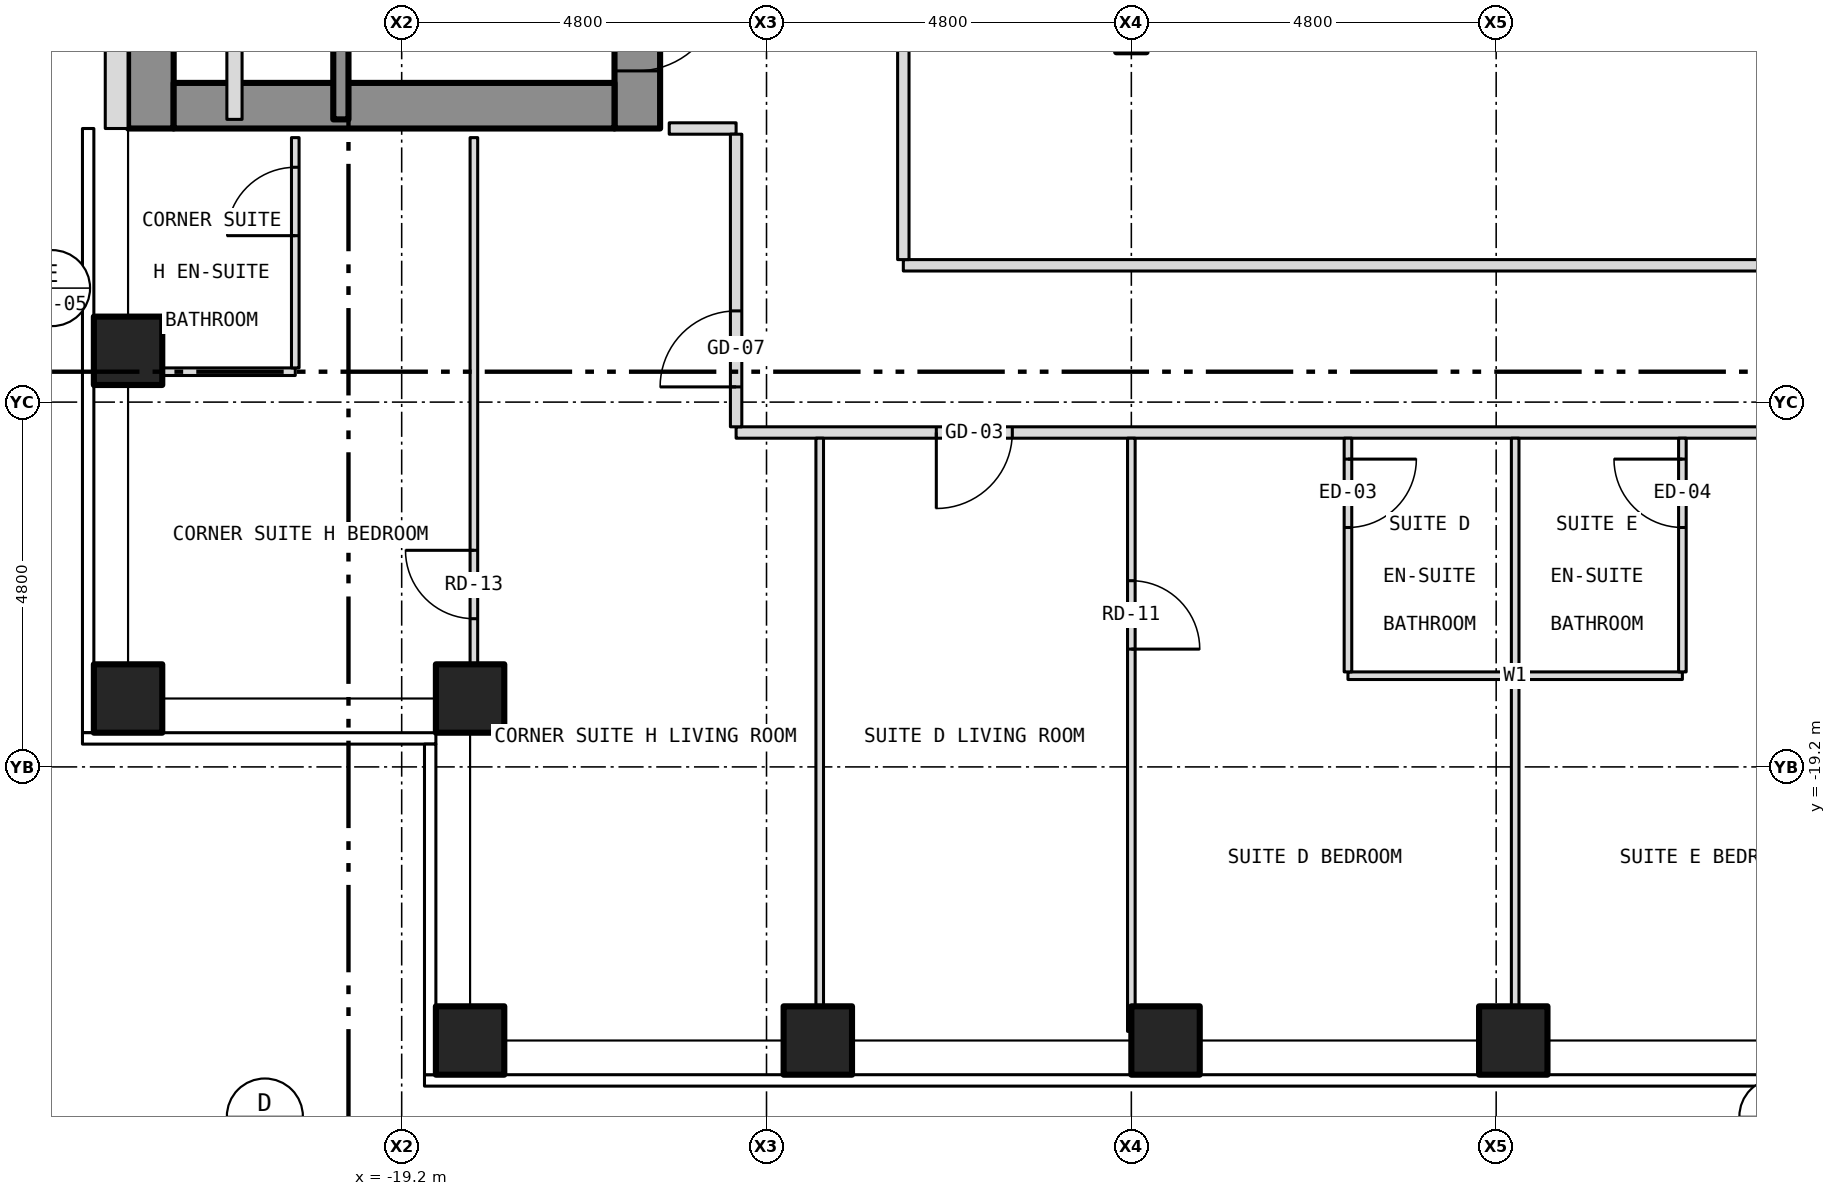
"""IFC4 building model, lengths in metres.
Left out: names, types, materials, properties, quantities, classifications, styles, units other than length and angle.
Written with IfcOpenShell. Run it as: python <this file> out.ifc"""

import sys

from ifc_helpers import new_model, si_unit, direction, frame, frame_2d, origin, origin_2d, place, context, subcontext, project, spatial, rectangle, hollow_rectangle, extrude, element, fill, save


model = new_model("IFC4")
c1 = context("Model", 3, precision=1e-05, world=origin(), true_north=direction((0.0, 1.0)))
c2 = subcontext(c1, "Body", "Model", "MODEL_VIEW")
j1 = project(units=[si_unit("LENGTHUNIT", "METRE"), si_unit("PLANEANGLEUNIT", "RADIAN")], contexts=[c1])
p1 = place(None, origin())
s1 = spatial("IfcSite", under=j1, at=p1, CompositionType="ELEMENT")
p2 = place(p1, origin())
s2 = spatial("IfcBuilding", under=s1, at=p2, CompositionType="ELEMENT")
p3 = place(p2, frame((0.0, 0.0, 99.5)))
s3 = spatial("IfcBuildingStorey", under=s2, at=p3, CompositionType="ELEMENT", Elevation=99.5)
for number, where, z_axis, x_axis in (
    (1, (-18.3, -22.8, -0.15), (0.0, 0.0, 1.0), (1.0, 0.0, 0.0)),
    (2, (-13.725, -22.8, -0.15), (0.0, 0.0, 1.0), (1.0, 0.0, 0.0)),
    (3, (-9.15, -22.8, -0.15), (0.0, 0.0, 1.0), (1.0, 0.0, 0.0)),
    (4, (-4.575, -22.8, -0.15), (0.0, 0.0, 1.0), (1.0, 0.0, 0.0)),
    (5, (-22.8, -18.3, -0.15), (0.0, 0.0, 1.0), (1.0, 0.0, 0.0)),
    (6, (-22.8, -13.725, -0.15), (0.0, 0.0, 1.0), (1.0, 0.0, 0.0)),
    (7, (-18.3, -18.3, -0.15), (0.0, 0.0, 1.0), (1.0, 0.0, 0.0)),
):
    element("IfcColumn", number, at=place(p3, frame(where, z_axis=z_axis, x_axis=x_axis)), inside=s3, PredefinedType="COLUMN", context=c2, shape_type="SweptSolid", body=[
        extrude(hollow_rectangle(XDim=0.9, YDim=0.9, WallThickness=0.05, at=origin_2d()), origin(), (0.0, 0.0, 1.0), 3.5),
    ])
p4 = place(p3, frame((-16.1, -10.8, 0.0), z_axis=(0.0, 0.0, 1.0), x_axis=(0.0, 1.0, 0.0)))
e8 = element("IfcWall", 8, at=p4, inside=s3, PredefinedType="SHEAR", context=c2, shape_type="SweptSolid", body=[
    extrude(rectangle(XDim=21.6, YDim=0.6, at=frame_2d((10.8, 0.0))), origin(), (0.0, 0.0, 1.0), 3.25),
])
p5 = place(p4, frame((9.4, 0.0, 0.0)))
e9 = element("IfcOpeningElement", 9, at=p5, cuts=e8, PredefinedType="OPENING", context=c2, shape_type="SweptSolid", body=[
    extrude(rectangle(XDim=1.1, YDim=2.1, at=frame_2d((0.55, 1.05))), frame((0.0, 0.312, 0.0), z_axis=(0.0, -1.0, 0.0), x_axis=(1.0, 0.0, 0.0)), (0.0, 0.0, 1.0), 0.624),
])
p6 = place(p4, frame((11.5, 0.0, 0.0)))
e10 = element("IfcOpeningElement", 10, at=p6, cuts=e8, PredefinedType="OPENING", context=c2, shape_type="SweptSolid", body=[
    extrude(rectangle(XDim=1.1, YDim=2.1, at=frame_2d((0.55, 1.05))), frame((0.0, 0.312, 0.0), z_axis=(0.0, -1.0, 0.0), x_axis=(1.0, 0.0, 0.0)), (0.0, 0.0, 1.0), 0.624),
])
p7 = place(p4, frame((13.6, 0.0, 0.0)))
e11 = element("IfcOpeningElement", 11, at=p7, cuts=e8, PredefinedType="OPENING", context=c2, shape_type="SweptSolid", body=[
    extrude(rectangle(XDim=1.1, YDim=2.1, at=frame_2d((0.55, 1.05))), frame((0.0, 0.312, 0.0), z_axis=(0.0, -1.0, 0.0), x_axis=(1.0, 0.0, 0.0)), (0.0, 0.0, 1.0), 0.624),
])
p8 = place(p4, frame((15.7, 0.0, 0.0)))
e12 = element("IfcOpeningElement", 12, at=p8, cuts=e8, PredefinedType="OPENING", context=c2, shape_type="SweptSolid", body=[
    extrude(rectangle(XDim=1.1, YDim=2.1, at=frame_2d((0.55, 1.05))), frame((0.0, 0.312, 0.0), z_axis=(0.0, -1.0, 0.0), x_axis=(1.0, 0.0, 0.0)), (0.0, 0.0, 1.0), 0.624),
])
p9 = place(p4, frame((17.8, 0.0, 0.0)))
e13 = element("IfcOpeningElement", 13, at=p9, cuts=e8, PredefinedType="OPENING", context=c2, shape_type="SweptSolid", body=[
    extrude(rectangle(XDim=1.1, YDim=2.1, at=frame_2d((0.55, 1.05))), frame((0.0, 0.312, 0.0), z_axis=(0.0, -1.0, 0.0), x_axis=(1.0, 0.0, 0.0)), (0.0, 0.0, 1.0), 0.624),
])
p10 = place(p4, frame((0.758, 0.0, 0.0)))
e14 = element("IfcOpeningElement", 14, at=p10, cuts=e8, PredefinedType="OPENING", context=c2, shape_type="SweptSolid", body=[
    extrude(rectangle(XDim=1.1, YDim=2.1, at=frame_2d((0.55, 1.05))), frame((0.0, 0.312, 0.0), z_axis=(0.0, -1.0, 0.0), x_axis=(1.0, 0.0, 0.0)), (0.0, 0.0, 1.0), 0.624),
])
p11 = place(p4, frame((7.5, 0.0, 0.0)))
e15 = element("IfcOpeningElement", 15, at=p11, cuts=e8, PredefinedType="OPENING", context=c2, shape_type="SweptSolid", body=[
    extrude(rectangle(XDim=1.1, YDim=2.1, at=frame_2d((0.55, 1.05))), frame((0.0, 0.312, 0.0), z_axis=(0.0, -1.0, 0.0), x_axis=(1.0, 0.0, 0.0)), (0.0, 0.0, 1.0), 0.624),
])
p12 = place(p3, frame((-22.5, -10.8, 0.0), z_axis=(0.0, 0.0, 1.0), x_axis=(0.0, 1.0, 0.0)))
e16 = element("IfcWall", 16, at=p12, inside=s3, PredefinedType="SHEAR", context=c2, shape_type="SweptSolid", body=[
    extrude(rectangle(XDim=21.6, YDim=0.6, at=frame_2d((10.8, 0.0))), origin(), (0.0, 0.0, 1.0), 3.25),
])
p13 = place(p3, frame((-22.2, -10.5, 0.0), z_axis=(0.0, 0.0, 1.0), x_axis=(1.0, 0.0, 0.0)))
e17 = element("IfcWall", 17, at=p13, inside=s3, PredefinedType="SHEAR", context=c2, shape_type="SweptSolid", body=[
    extrude(rectangle(XDim=5.8, YDim=0.6, at=frame_2d((2.9, 0.0))), origin(), (0.0, 0.0, 1.0), 3.25),
])
p14 = place(p3, frame((-22.95, 10.8, 0.0), z_axis=(0.0, 0.0, 1.0), x_axis=(0.0, -1.0, 0.0)))
e18 = element("IfcWall", 18, at=p14, inside=s3, PredefinedType="SOLIDWALL", context=c2, shape_type="SweptSolid", body=[
    extrude(rectangle(XDim=21.6, YDim=0.3, at=frame_2d((10.8, 0.0))), origin(), (0.0, 0.0, 1.0), 3.5),
])
p15 = place(p14, frame((18.05, 0.0, 1.0)))
e19 = element("IfcOpeningElement", 19, at=p15, cuts=e18, PredefinedType="OPENING", context=c2, shape_type="SweptSolid", body=[
    extrude(rectangle(XDim=0.6, YDim=1.5, at=frame_2d((0.3, 0.75))), frame((0.0, 0.162, 0.0), z_axis=(0.0, -1.0, 0.0), x_axis=(1.0, 0.0, 0.0)), (0.0, 0.0, 1.0), 0.324),
])
p16 = place(p3, frame((-6.75, -18.0, 0.0), z_axis=(0.0, 0.0, 1.0), x_axis=(1.0, 0.0, 0.0)))
e20 = element("IfcWall", 20, at=p16, inside=s3, PredefinedType="PARTITIONING", context=c2, shape_type="SweptSolid", body=[
    extrude(rectangle(XDim=4.4, YDim=0.1, at=frame_2d((2.2, 0.0))), origin(), (0.0, 0.0, 1.0), 3.35),
])
p17 = place(p3, frame((-14.8, -14.8, 0.0), z_axis=(0.0, 0.0, 1.0), x_axis=(1.0, 0.0, 0.0)))
e21 = element("IfcWall", 21, at=p17, inside=s3, PredefinedType="PARTITIONING", context=c2, shape_type="SweptSolid", body=[
    extrude(rectangle(XDim=29.6, YDim=0.15, at=frame_2d((14.8, 0.0))), origin(), (0.0, 0.0, 1.0), 3.35),
])
p18 = place(p17, frame((2.634, 0.0, 0.0)))
e22 = element("IfcOpeningElement", 22, at=p18, cuts=e21, PredefinedType="OPENING", context=c2, shape_type="SweptSolid", body=[
    extrude(rectangle(XDim=1.0, YDim=2.1, at=frame_2d((0.5, 1.05))), frame((0.0, 0.087, 0.0), z_axis=(0.0, -1.0, 0.0), x_axis=(1.0, 0.0, 0.0)), (0.0, 0.0, 1.0), 0.174),
])
p19 = place(p17, frame((16.816, 0.0, 0.0)))
e23 = element("IfcOpeningElement", 23, at=p19, cuts=e21, PredefinedType="OPENING", context=c2, shape_type="SweptSolid", body=[
    extrude(rectangle(XDim=1.0, YDim=2.1, at=frame_2d((0.5, 1.05))), frame((0.0, 0.087, 0.0), z_axis=(0.0, -1.0, 0.0), x_axis=(1.0, 0.0, 0.0)), (0.0, 0.0, 1.0), 0.174),
])
p20 = place(p17, frame((22.263, 0.0, 0.0)))
e24 = element("IfcOpeningElement", 24, at=p20, cuts=e21, PredefinedType="OPENING", context=c2, shape_type="SweptSolid", body=[
    extrude(rectangle(XDim=1.0, YDim=2.1, at=frame_2d((0.5, 1.05))), frame((0.0, 0.087, 0.0), z_axis=(0.0, -1.0, 0.0), x_axis=(1.0, 0.0, 0.0)), (0.0, 0.0, 1.0), 0.174),
])
p21 = place(p17, frame((26.837, 0.0, 0.0)))
e25 = element("IfcOpeningElement", 25, at=p21, cuts=e21, PredefinedType="OPENING", context=c2, shape_type="SweptSolid", body=[
    extrude(rectangle(XDim=1.0, YDim=2.1, at=frame_2d((0.5, 1.05))), frame((0.0, 0.087, 0.0), z_axis=(0.0, -1.0, 0.0), x_axis=(1.0, 0.0, 0.0)), (0.0, 0.0, 1.0), 0.174),
])
p22 = place(p3, frame((-22.68, -14.0, 0.0), z_axis=(0.0, 0.0, 1.0), x_axis=(1.0, 0.0, 0.0)))
e26 = element("IfcWall", 26, at=p22, inside=s3, PredefinedType="PARTITIONING", context=c2, shape_type="SweptSolid", body=[
    extrude(rectangle(XDim=2.08, YDim=0.1, at=frame_2d((1.04, 0.0))), origin(), (0.0, 0.0, 1.0), 3.35),
])
p23 = place(p3, frame((-12.6, -12.6, 0.0), z_axis=(0.0, 0.0, 1.0), x_axis=(1.0, 0.0, 0.0)))
e27 = element("IfcWall", 27, at=p23, inside=s3, PredefinedType="PARTITIONING", context=c2, shape_type="SweptSolid", body=[
    extrude(rectangle(XDim=25.2, YDim=0.15, at=frame_2d((12.6, 0.0))), origin(), (0.0, 0.0, 1.0), 3.35),
])
p24 = place(p23, frame((12.15, 0.0, 0.0)))
e28 = element("IfcOpeningElement", 28, at=p24, cuts=e27, PredefinedType="OPENING", context=c2, shape_type="SweptSolid", body=[
    extrude(rectangle(XDim=0.9, YDim=2.1, at=frame_2d((0.45, 1.05))), frame((0.0, 0.087, 0.0), z_axis=(0.0, -1.0, 0.0), x_axis=(1.0, 0.0, 0.0)), (0.0, 0.0, 1.0), 0.174),
])
p25 = place(p3, frame((-15.68, -10.8, 0.0), z_axis=(0.0, 0.0, 1.0), x_axis=(1.0, 0.0, 0.0)))
e29 = element("IfcWall", 29, at=p25, inside=s3, PredefinedType="PARTITIONING", context=c2, shape_type="SweptSolid", body=[
    extrude(rectangle(XDim=0.88, YDim=0.15, at=frame_2d((0.44, 0.0))), origin(), (0.0, 0.0, 1.0), 3.35),
])
p26 = place(p3, frame((-21.4, -10.68, 0.0), z_axis=(0.0, 0.0, 1.0), x_axis=(0.0, 1.0, 0.0)))
e30 = element("IfcWall", 30, at=p26, inside=s3, PredefinedType="PARTITIONING", context=c2, shape_type="SweptSolid", body=[
    extrude(rectangle(XDim=8.68, YDim=0.2, at=frame_2d((4.34, 0.0))), origin(), (0.0, 0.0, 1.0), 3.25),
])
p27 = place(p26, frame((3.88, 0.0, 0.0)))
e31 = element("IfcOpeningElement", 31, at=p27, cuts=e30, PredefinedType="OPENING", context=c2, shape_type="SweptSolid", body=[
    extrude(rectangle(XDim=0.9, YDim=2.1, at=frame_2d((0.45, 1.05))), frame((0.0, 0.112, 0.0), z_axis=(0.0, -1.0, 0.0), x_axis=(1.0, 0.0, 0.0)), (0.0, 0.0, 1.0), 0.224),
])
p28 = place(p3, frame((-20.6, -13.95, 0.0), z_axis=(0.0, 0.0, 1.0), x_axis=(0.0, 1.0, 0.0)))
e32 = element("IfcWall", 32, at=p28, inside=s3, PredefinedType="PARTITIONING", context=c2, shape_type="SweptSolid", body=[
    extrude(rectangle(XDim=3.03, YDim=0.1, at=frame_2d((1.515, 0.0))), origin(), (0.0, 0.0, 1.0), 3.35),
])
p29 = place(p28, frame((1.74, 0.0, 0.0)))
e33 = element("IfcOpeningElement", 33, at=p29, cuts=e32, PredefinedType="OPENING", context=c2, shape_type="SweptSolid", body=[
    extrude(rectangle(XDim=0.9, YDim=2.1, at=frame_2d((0.45, 1.05))), frame((0.0, 0.062, 0.0), z_axis=(0.0, -1.0, 0.0), x_axis=(1.0, 0.0, 0.0)), (0.0, 0.0, 1.0), 0.124),
])
p30 = place(p3, frame((-20.0, -10.68, 0.0), z_axis=(0.0, 0.0, 1.0), x_axis=(0.0, 1.0, 0.0)))
e34 = element("IfcWall", 34, at=p30, inside=s3, PredefinedType="SHEAR", context=c2, shape_type="SweptSolid", body=[
    extrude(rectangle(XDim=6.98, YDim=0.2, at=frame_2d((3.49, 0.0))), origin(), (0.0, 0.0, 1.0), 3.25),
])
p31 = place(p3, frame((-18.25, -18.191, 0.0), z_axis=(0.0, 0.0, 1.0), x_axis=(0.0, 1.0, 0.0)))
e35 = element("IfcWall", 35, at=p31, inside=s3, PredefinedType="PARTITIONING", context=c2, shape_type="SweptSolid", body=[
    extrude(rectangle(XDim=7.271, YDim=0.1, at=frame_2d((3.635, 0.0))), origin(), (0.0, 0.0, 1.0), 3.35),
])
p32 = place(p31, frame((0.941, 0.0, 0.0)))
e36 = element("IfcOpeningElement", 36, at=p32, cuts=e35, PredefinedType="OPENING", context=c2, shape_type="SweptSolid", body=[
    extrude(rectangle(XDim=0.9, YDim=2.1, at=frame_2d((0.45, 1.05))), frame((0.0, 0.062, 0.0), z_axis=(0.0, -1.0, 0.0), x_axis=(1.0, 0.0, 0.0)), (0.0, 0.0, 1.0), 0.124),
])
p33 = place(p3, frame((-14.8, -14.725, 0.0), z_axis=(0.0, 0.0, 1.0), x_axis=(0.0, 1.0, 0.0)))
e37 = element("IfcWall", 37, at=p33, inside=s3, PredefinedType="PARTITIONING", context=c2, shape_type="SweptSolid", body=[
    extrude(rectangle(XDim=3.85, YDim=0.15, at=frame_2d((1.925, 0.0))), origin(), (0.0, 0.0, 1.0), 3.35),
])
p34 = place(p33, frame((0.525, 0.0, 0.0)))
e38 = element("IfcOpeningElement", 38, at=p34, cuts=e37, PredefinedType="OPENING", context=c2, shape_type="SweptSolid", body=[
    extrude(rectangle(XDim=1.0, YDim=2.1, at=frame_2d((0.5, 1.05))), frame((0.0, 0.087, 0.0), z_axis=(0.0, -1.0, 0.0), x_axis=(1.0, 0.0, 0.0)), (0.0, 0.0, 1.0), 0.174),
])
p35 = place(p3, frame((-13.7, -22.68, 0.0), z_axis=(0.0, 0.0, 1.0), x_axis=(0.0, 1.0, 0.0)))
e39 = element("IfcWall", 39, at=p35, inside=s3, PredefinedType="PARTITIONING", context=c2, shape_type="SweptSolid", body=[
    extrude(rectangle(XDim=7.805, YDim=0.1, at=frame_2d((3.902, 0.0))), origin(), (0.0, 0.0, 1.0), 3.35),
])
p36 = place(p3, frame((-12.6, -12.525, 0.0), z_axis=(0.0, 0.0, 1.0), x_axis=(0.0, 1.0, 0.0)))
e40 = element("IfcWall", 40, at=p36, inside=s3, PredefinedType="PARTITIONING", context=c2, shape_type="SweptSolid", body=[
    extrude(rectangle(XDim=10.525, YDim=0.15, at=frame_2d((5.262, 0.0))), origin(), (0.0, 0.0, 1.0), 3.35),
])
p37 = place(p3, frame((-9.6, -22.68, 0.0), z_axis=(0.0, 0.0, 1.0), x_axis=(0.0, 1.0, 0.0)))
e41 = element("IfcWall", 41, at=p37, inside=s3, PredefinedType="PARTITIONING", context=c2, shape_type="SweptSolid", body=[
    extrude(rectangle(XDim=0.33, YDim=0.1, at=frame_2d((0.165, 0.0))), origin(), (0.0, 0.0, 1.0), 3.35),
])
p38 = place(p3, frame((-9.6, -22.35, 0.0), z_axis=(0.0, 0.0, 1.0), x_axis=(0.0, 1.0, 0.0)))
e42 = element("IfcWall", 42, at=p38, inside=s3, PredefinedType="PARTITIONING", context=c2, shape_type="SweptSolid", body=[
    extrude(rectangle(XDim=7.475, YDim=0.1, at=frame_2d((3.738, 0.0))), origin(), (0.0, 0.0, 1.0), 2.728),
])
p39 = place(p38, frame((4.7, 0.0, 0.0)))
e43 = element("IfcOpeningElement", 43, at=p39, cuts=e42, PredefinedType="OPENING", context=c2, shape_type="SweptSolid", body=[
    extrude(rectangle(XDim=0.9, YDim=2.1, at=frame_2d((0.45, 1.05))), frame((0.0, 0.062, 0.0), z_axis=(0.0, -1.0, 0.0), x_axis=(1.0, 0.0, 0.0)), (0.0, 0.0, 1.0), 0.124),
])
p40 = place(p3, frame((-6.75, -17.95, 0.0), z_axis=(0.0, 0.0, 1.0), x_axis=(0.0, 1.0, 0.0)))
e44 = element("IfcWall", 44, at=p40, inside=s3, PredefinedType="PARTITIONING", context=c2, shape_type="SweptSolid", body=[
    extrude(rectangle(XDim=3.075, YDim=0.1, at=frame_2d((1.538, 0.0))), origin(), (0.0, 0.0, 1.0), 3.35),
])
p41 = place(p40, frame((1.9, 0.0, 0.0)))
e45 = element("IfcOpeningElement", 45, at=p41, cuts=e44, PredefinedType="OPENING", context=c2, shape_type="SweptSolid", body=[
    extrude(rectangle(XDim=0.9, YDim=2.1, at=frame_2d((0.45, 1.05))), frame((0.0, 0.062, 0.0), z_axis=(0.0, -1.0, 0.0), x_axis=(1.0, 0.0, 0.0)), (0.0, 0.0, 1.0), 0.124),
])
p42 = place(p3, frame((-4.55, -22.68, 0.0), z_axis=(0.0, 0.0, 1.0), x_axis=(0.0, 1.0, 0.0)))
e46 = element("IfcWall", 46, at=p42, inside=s3, PredefinedType="PARTITIONING", context=c2, shape_type="SweptSolid", body=[
    extrude(rectangle(XDim=4.63, YDim=0.1, at=frame_2d((2.315, 0.0))), origin(), (0.0, 0.0, 1.0), 3.35),
])
p43 = place(p3, frame((-4.55, -17.95, 0.0), z_axis=(0.0, 0.0, 1.0), x_axis=(0.0, 1.0, 0.0)))
e47 = element("IfcWall", 47, at=p43, inside=s3, PredefinedType="PARTITIONING", context=c2, shape_type="SweptSolid", body=[
    extrude(rectangle(XDim=3.075, YDim=0.1, at=frame_2d((1.538, 0.0))), origin(), (0.0, 0.0, 1.0), 3.35),
])
p44 = place(p3, frame((-2.35, -17.95, 0.0), z_axis=(0.0, 0.0, 1.0), x_axis=(0.0, 1.0, 0.0)))
e48 = element("IfcWall", 48, at=p44, inside=s3, PredefinedType="PARTITIONING", context=c2, shape_type="SweptSolid", body=[
    extrude(rectangle(XDim=3.075, YDim=0.1, at=frame_2d((1.538, 0.0))), origin(), (0.0, 0.0, 1.0), 3.35),
])
p45 = place(p44, frame((1.9, 0.0, 0.0)))
e49 = element("IfcOpeningElement", 49, at=p45, cuts=e48, PredefinedType="OPENING", context=c2, shape_type="SweptSolid", body=[
    extrude(rectangle(XDim=0.9, YDim=2.1, at=frame_2d((0.45, 1.05))), frame((0.0, 0.062, 0.0), z_axis=(0.0, -1.0, 0.0), x_axis=(1.0, 0.0, 0.0)), (0.0, 0.0, 1.0), 0.124),
])
p46 = place(p10, origin())
e50 = element("IfcDoor", 50, at=p46, inside=s3, OperationType="SINGLE_SWING_RIGHT", PredefinedType="DOOR", context=c2, shape_type="SweptSolid", body=[
    extrude(rectangle(XDim=1.1, YDim=2.1, at=frame_2d((0.55, 1.05))), frame((0.0, 0.025, 0.0), z_axis=(0.0, -1.0, 0.0), x_axis=(1.0, 0.0, 0.0)), (0.0, 0.0, 1.0), 0.05),
])
fill(e14, e50)
p47 = place(p18, origin())
e51 = element("IfcDoor", 51, at=p47, inside=s3, OperationType="SINGLE_SWING_LEFT", PredefinedType="DOOR", context=c2, shape_type="SweptSolid", body=[
    extrude(rectangle(XDim=1.0, YDim=2.1, at=frame_2d((0.5, 1.05))), frame((0.0, 0.025, 0.0), z_axis=(0.0, -1.0, 0.0), x_axis=(1.0, 0.0, 0.0)), (0.0, 0.0, 1.0), 0.05),
])
fill(e22, e51)
p48 = place(p39, origin())
e52 = element("IfcDoor", 52, at=p48, inside=s3, OperationType="SINGLE_SWING_LEFT", PredefinedType="DOOR", context=c2, shape_type="SweptSolid", body=[
    extrude(rectangle(XDim=0.9, YDim=2.1, at=frame_2d((0.45, 1.05))), frame((0.0, 0.025, 0.0), z_axis=(0.0, -1.0, 0.0), x_axis=(1.0, 0.0, 0.0)), (0.0, 0.0, 1.0), 0.05),
])
fill(e43, e52)
p49 = place(p41, origin())
e53 = element("IfcDoor", 53, at=p49, inside=s3, OperationType="SINGLE_SWING_RIGHT", PredefinedType="DOOR", context=c2, shape_type="SweptSolid", body=[
    extrude(rectangle(XDim=0.9, YDim=2.1, at=frame_2d((0.45, 1.05))), frame((0.0, 0.025, 0.0), z_axis=(0.0, -1.0, 0.0), x_axis=(1.0, 0.0, 0.0)), (0.0, 0.0, 1.0), 0.05),
])
fill(e45, e53)
p50 = place(p45, origin())
e54 = element("IfcDoor", 54, at=p50, inside=s3, OperationType="SINGLE_SWING_RIGHT", PredefinedType="DOOR", context=c2, shape_type="SweptSolid", body=[
    extrude(rectangle(XDim=0.9, YDim=2.1, at=frame_2d((0.45, 1.05))), frame((0.0, 0.025, 0.0), z_axis=(0.0, -1.0, 0.0), x_axis=(1.0, 0.0, 0.0)), (0.0, 0.0, 1.0), 0.05),
])
fill(e49, e54)
p51 = place(p34, origin())
e55 = element("IfcDoor", 55, at=p51, inside=s3, OperationType="SINGLE_SWING_LEFT", PredefinedType="DOOR", context=c2, shape_type="SweptSolid", body=[
    extrude(rectangle(XDim=1.0, YDim=2.1, at=frame_2d((0.5, 1.05))), frame((0.0, 0.025, 0.0), z_axis=(0.0, -1.0, 0.0), x_axis=(1.0, 0.0, 0.0)), (0.0, 0.0, 1.0), 0.05),
])
fill(e38, e55)
p52 = place(p32, origin())
e56 = element("IfcDoor", 56, at=p52, inside=s3, OperationType="SINGLE_SWING_RIGHT", PredefinedType="DOOR", context=c2, shape_type="SweptSolid", body=[
    extrude(rectangle(XDim=0.9, YDim=2.1, at=frame_2d((0.45, 1.05))), frame((0.0, 0.025, 0.0), z_axis=(0.0, -1.0, 0.0), x_axis=(1.0, 0.0, 0.0)), (0.0, 0.0, 1.0), 0.05),
])
fill(e36, e56)
p53 = place(p29, origin())
e57 = element("IfcDoor", 57, at=p53, inside=s3, OperationType="SINGLE_SWING_LEFT", PredefinedType="DOOR", context=c2, shape_type="SweptSolid", body=[
    extrude(rectangle(XDim=0.9, YDim=2.1, at=frame_2d((0.45, 1.05))), frame((0.0, 0.025, 0.0), z_axis=(0.0, -1.0, 0.0), x_axis=(1.0, 0.0, 0.0)), (0.0, 0.0, 1.0), 0.05),
])
fill(e33, e57)
save(model, sys.argv[1])
